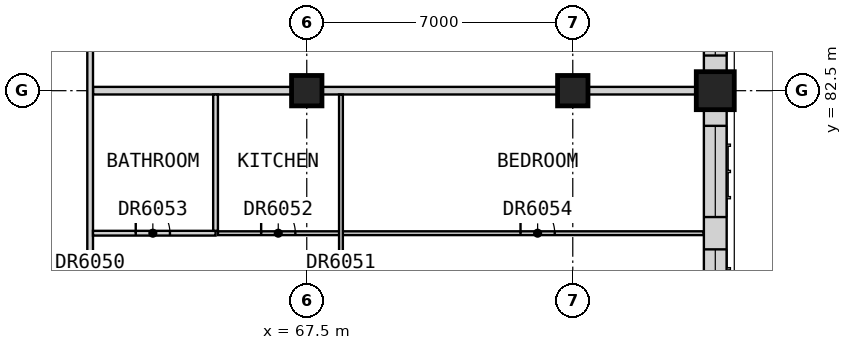
"""IFC4 building model, lengths in metres.
Left out: names, types, materials, properties, quantities, classifications, styles, units other than length and angle.
Written with IfcOpenShell. Run it as: python <this file> out.ifc"""

import sys

from ifc_helpers import new_model, si_unit, direction, frame, frame_2d, origin, origin_2d, place, context, subcontext, project, spatial, rectangle, extrude, element, fill, save


model = new_model("IFC4")
c1 = context("Model", 3, precision=1e-05, world=origin(), true_north=direction((0.0, 1.0)))
c2 = subcontext(c1, "Body", "Model", "MODEL_VIEW")
j1 = project(units=[si_unit("LENGTHUNIT", "METRE"), si_unit("PLANEANGLEUNIT", "RADIAN")], contexts=[c1])
p1 = place(None, origin())
s1 = spatial("IfcSite", under=j1, at=p1, CompositionType="ELEMENT")
p2 = place(p1, origin())
s2 = spatial("IfcBuilding", under=s1, at=p2, CompositionType="ELEMENT")
p3 = place(p2, frame((0.0, 0.0, 226.7)))
s3 = spatial("IfcBuildingStorey", under=s2, at=p3, CompositionType="ELEMENT", Elevation=226.7)
p4 = place(p3, frame((78.25, 82.5, 0.0), z_axis=(0.0, 0.0, 1.0), x_axis=(1.0, 0.0, 0.0)))
e1 = element("IfcColumn", 1, at=p4, inside=s3, PredefinedType="COLUMN", context=c2, shape_type="SweptSolid", body=[
    extrude(rectangle(XDim=1.0, YDim=1.0, at=origin_2d()), origin(), (0.0, 0.0, 1.0), 3.5),
])
for number, where, z_axis, x_axis in (
    (2, (67.5, 82.5, 0.0), (0.0, 0.0, 1.0), (1.0, 0.0, 0.0)),
    (3, (74.5, 82.5, 0.0), (0.0, 0.0, 1.0), (1.0, 0.0, 0.0)),
):
    element("IfcColumn", number, at=place(p3, frame(where, z_axis=z_axis, x_axis=x_axis)), inside=s3, PredefinedType="COLUMN", context=c2, shape_type="SweptSolid", body=[
        extrude(rectangle(XDim=0.8, YDim=0.8, at=origin_2d()), origin(), (0.0, 0.0, 1.0), 3.5),
    ])
p5 = place(p3, frame((78.25, 75.5, 0.0), z_axis=(0.0, 0.0, 1.0), x_axis=(0.0, 1.0, 0.0)))
e4 = element("IfcWall", 4, at=p5, inside=s3, PredefinedType="SOLIDWALL", context=c2, shape_type="SweptSolid", body=[
    extrude(rectangle(XDim=6.5, YDim=0.6, at=frame_2d((3.25, 0.0))), origin(), (0.0, 0.0, 1.0), 2.75),
])
p6 = place(p5, frame((0.425, 0.0, 0.8)))
e5 = element("IfcOpeningElement", 5, at=p6, cuts=e4, PredefinedType="OPENING", context=c2, shape_type="SweptSolid", body=[
    extrude(rectangle(XDim=2.4, YDim=1.8, at=frame_2d((1.2, 0.9))), frame((0.0, 0.31, 0.0), z_axis=(0.0, -1.0, 0.0), x_axis=(1.0, 0.0, 0.0)), (0.0, 0.0, 1.0), 0.62),
])
p7 = place(p5, frame((3.675, 0.0, 0.8)))
e6 = element("IfcOpeningElement", 6, at=p7, cuts=e4, PredefinedType="OPENING", context=c2, shape_type="SweptSolid", body=[
    extrude(rectangle(XDim=2.4, YDim=1.8, at=frame_2d((1.2, 0.9))), frame((0.0, 0.31, 0.0), z_axis=(0.0, -1.0, 0.0), x_axis=(1.0, 0.0, 0.0)), (0.0, 0.0, 1.0), 0.62),
])
p8 = place(p3, frame((78.25, 83.0, 0.0), z_axis=(0.0, 0.0, 1.0), x_axis=(0.0, 1.0, 0.0)))
e7 = element("IfcWall", 7, at=p8, inside=s3, PredefinedType="SOLIDWALL", context=c2, shape_type="SweptSolid", body=[
    extrude(rectangle(XDim=6.5, YDim=0.6, at=frame_2d((3.25, 0.0))), origin(), (0.0, 0.0, 1.0), 2.75),
])
p9 = place(p8, frame((0.425, 0.0, 0.8)))
e8 = element("IfcOpeningElement", 8, at=p9, cuts=e7, PredefinedType="OPENING", context=c2, shape_type="SweptSolid", body=[
    extrude(rectangle(XDim=2.4, YDim=1.8, at=frame_2d((1.2, 0.9))), frame((0.0, 0.31, 0.0), z_axis=(0.0, -1.0, 0.0), x_axis=(1.0, 0.0, 0.0)), (0.0, 0.0, 1.0), 0.62),
])
p10 = place(p8, frame((3.675, 0.0, 0.8)))
e9 = element("IfcOpeningElement", 9, at=p10, cuts=e7, PredefinedType="OPENING", context=c2, shape_type="SweptSolid", body=[
    extrude(rectangle(XDim=2.4, YDim=1.8, at=frame_2d((1.2, 0.9))), frame((0.0, 0.31, 0.0), z_axis=(0.0, -1.0, 0.0), x_axis=(1.0, 0.0, 0.0)), (0.0, 0.0, 1.0), 0.62),
])
p11 = place(p3, frame((61.875, 82.5, 0.0), z_axis=(0.0, 0.0, 1.0), x_axis=(1.0, 0.0, 0.0)))
e10 = element("IfcWall", 10, at=p11, inside=s3, PredefinedType="PARTITIONING", context=c2, shape_type="SweptSolid", body=[
    extrude(rectangle(XDim=16.875, YDim=0.2, at=frame_2d((8.438, 0.0))), origin(), (0.0, 0.0, 1.0), 3.25),
])
p12 = place(p3, frame((61.8, 58.275, 0.0), z_axis=(0.0, 0.0, 1.0), x_axis=(0.0, 1.0, 0.0)))
e11 = element("IfcWall", 11, at=p12, inside=s3, PredefinedType="PARTITIONING", context=c2, shape_type="SweptSolid", body=[
    extrude(rectangle(XDim=25.95, YDim=0.15, at=frame_2d((12.975, 0.0))), origin(), (0.0, 0.0, 1.0), 3.25),
])
p13 = place(p12, frame((4.575, 0.0, 0.0)))
e12 = element("IfcOpeningElement", 12, at=p13, cuts=e11, PredefinedType="OPENING", context=c2, shape_type="SweptSolid", body=[
    extrude(rectangle(XDim=1.8, YDim=2.1, at=frame_2d((0.9, 1.05))), frame((0.0, 0.085, 0.0), z_axis=(0.0, -1.0, 0.0), x_axis=(1.0, 0.0, 0.0)), (0.0, 0.0, 1.0), 0.17),
])
p14 = place(p12, frame((10.65, 0.0, 0.0)))
e13 = element("IfcOpeningElement", 13, at=p14, cuts=e11, PredefinedType="OPENING", context=c2, shape_type="SweptSolid", body=[
    extrude(rectangle(XDim=0.9, YDim=2.1, at=frame_2d((0.45, 1.05))), frame((0.0, 0.085, 0.0), z_axis=(0.0, -1.0, 0.0), x_axis=(1.0, 0.0, 0.0)), (0.0, 0.0, 1.0), 0.17),
])
p15 = place(p12, frame((18.15, 0.0, 0.0)))
e14 = element("IfcOpeningElement", 14, at=p15, cuts=e11, PredefinedType="OPENING", context=c2, shape_type="SweptSolid", body=[
    extrude(rectangle(XDim=0.9, YDim=2.1, at=frame_2d((0.45, 1.05))), frame((0.0, 0.085, 0.0), z_axis=(0.0, -1.0, 0.0), x_axis=(1.0, 0.0, 0.0)), (0.0, 0.0, 1.0), 0.17),
])
p16 = place(p3, frame((65.163, 78.75, 0.0), z_axis=(0.0, 0.0, 1.0), x_axis=(1.0, 0.0, 0.0)))
e15 = element("IfcWall", 15, at=p16, inside=s3, PredefinedType="PARTITIONING", context=c2, shape_type="SweptSolid", body=[
    extrude(rectangle(XDim=12.777, YDim=0.1, at=frame_2d((6.389, 0.0))), origin(), (0.0, 0.0, 1.0), 3.25),
])
p17 = place(p16, frame((1.137, 0.0, 0.0)))
e16 = element("IfcOpeningElement", 16, at=p17, cuts=e15, PredefinedType="OPENING", context=c2, shape_type="SweptSolid", body=[
    extrude(rectangle(XDim=0.9, YDim=2.1, at=frame_2d((0.45, 1.05))), frame((0.0, 0.06, 0.0), z_axis=(0.0, -1.0, 0.0), x_axis=(1.0, 0.0, 0.0)), (0.0, 0.0, 1.0), 0.12),
])
p18 = place(p16, frame((7.962, 0.0, 0.0)))
e17 = element("IfcOpeningElement", 17, at=p18, cuts=e15, PredefinedType="OPENING", context=c2, shape_type="SweptSolid", body=[
    extrude(rectangle(XDim=0.9, YDim=2.1, at=frame_2d((0.45, 1.05))), frame((0.0, 0.06, 0.0), z_axis=(0.0, -1.0, 0.0), x_axis=(1.0, 0.0, 0.0)), (0.0, 0.0, 1.0), 0.12),
])
p19 = place(p3, frame((68.4, 67.6, 0.0), z_axis=(0.0, 0.0, 1.0), x_axis=(0.0, 1.0, 0.0)))
e18 = element("IfcWall", 18, at=p19, inside=s3, PredefinedType="PARTITIONING", context=c2, shape_type="SweptSolid", body=[
    extrude(rectangle(XDim=14.8, YDim=0.1, at=frame_2d((7.4, 0.0))), origin(), (0.0, 0.0, 1.0), 3.25),
])
p20 = place(p19, frame((1.325, 0.0, 0.0)))
e19 = element("IfcOpeningElement", 19, at=p20, cuts=e18, PredefinedType="OPENING", context=c2, shape_type="SweptSolid", body=[
    extrude(rectangle(XDim=0.9, YDim=2.1, at=frame_2d((0.45, 1.05))), frame((0.0, 0.06, 0.0), z_axis=(0.0, -1.0, 0.0), x_axis=(1.0, 0.0, 0.0)), (0.0, 0.0, 1.0), 0.12),
])
p21 = place(p19, frame((8.825, 0.0, 0.0)))
e20 = element("IfcOpeningElement", 20, at=p21, cuts=e18, PredefinedType="OPENING", context=c2, shape_type="SweptSolid", body=[
    extrude(rectangle(XDim=0.9, YDim=2.1, at=frame_2d((0.45, 1.05))), frame((0.0, 0.06, 0.0), z_axis=(0.0, -1.0, 0.0), x_axis=(1.0, 0.0, 0.0)), (0.0, 0.0, 1.0), 0.12),
])
p22 = place(p3, frame((61.875, 78.75, 0.0), z_axis=(0.0, 0.0, 1.0), x_axis=(1.0, 0.0, 0.0)))
e21 = element("IfcWall", 21, at=p22, inside=s3, PredefinedType="PARTITIONING", context=c2, shape_type="SweptSolid", body=[
    extrude(rectangle(XDim=3.225, YDim=0.125, at=frame_2d((1.613, 0.0))), origin(), (0.0, 0.0, 1.0), 3.25),
])
p23 = place(p22, frame((1.125, 0.0, 0.0)))
e22 = element("IfcOpeningElement", 22, at=p23, cuts=e21, PredefinedType="OPENING", context=c2, shape_type="SweptSolid", body=[
    extrude(rectangle(XDim=0.9, YDim=2.1, at=frame_2d((0.45, 1.05))), frame((0.0, 0.073, 0.0), z_axis=(0.0, -1.0, 0.0), x_axis=(1.0, 0.0, 0.0)), (0.0, 0.0, 1.0), 0.145),
])
p24 = place(p3, frame((65.1, 78.812, 0.0), z_axis=(0.0, 0.0, 1.0), x_axis=(0.0, 1.0, 0.0)))
e23 = element("IfcWall", 23, at=p24, inside=s3, PredefinedType="PARTITIONING", context=c2, shape_type="SweptSolid", body=[
    extrude(rectangle(XDim=3.587, YDim=0.125, at=frame_2d((1.794, 0.0))), origin(), (0.0, 0.0, 1.0), 3.25),
])
p25 = place(p6, origin())
e24 = element("IfcWindow", 24, at=p25, inside=s3, PartitioningType="SINGLE_PANEL", PredefinedType="WINDOW", context=c2, shape_type="SweptSolid", body=[
    extrude(rectangle(XDim=2.4, YDim=1.8, at=frame_2d((1.2, 0.9))), frame((0.0, -0.07, 0.0), z_axis=(0.0, -1.0, 0.0), x_axis=(1.0, 0.0, 0.0)), (0.0, 0.0, 1.0), 0.06),
])
fill(e5, e24)
p26 = place(p7, origin())
e25 = element("IfcWindow", 25, at=p26, inside=s3, PartitioningType="SINGLE_PANEL", PredefinedType="WINDOW", context=c2, shape_type="SweptSolid", body=[
    extrude(rectangle(XDim=2.4, YDim=1.8, at=frame_2d((1.2, 0.9))), frame((0.0, -0.07, 0.0), z_axis=(0.0, -1.0, 0.0), x_axis=(1.0, 0.0, 0.0)), (0.0, 0.0, 1.0), 0.06),
])
fill(e6, e25)
p27 = place(p9, origin())
e26 = element("IfcWindow", 26, at=p27, inside=s3, PartitioningType="SINGLE_PANEL", PredefinedType="WINDOW", context=c2, shape_type="SweptSolid", body=[
    extrude(rectangle(XDim=2.4, YDim=1.8, at=frame_2d((1.2, 0.9))), frame((0.0, -0.07, 0.0), z_axis=(0.0, -1.0, 0.0), x_axis=(1.0, 0.0, 0.0)), (0.0, 0.0, 1.0), 0.06),
])
fill(e8, e26)
p28 = place(p17, origin())
e27 = element("IfcDoor", 27, at=p28, inside=s3, OperationType="SINGLE_SWING_LEFT", PredefinedType="DOOR", context=c2, shape_type="SweptSolid", body=[
    extrude(rectangle(XDim=0.9, YDim=2.1, at=frame_2d((0.45, 1.05))), frame((0.0, 0.025, 0.0), z_axis=(0.0, -1.0, 0.0), x_axis=(1.0, 0.0, 0.0)), (0.0, 0.0, 1.0), 0.05),
])
fill(e16, e27)
p29 = place(p23, origin())
e28 = element("IfcDoor", 28, at=p29, inside=s3, OperationType="SINGLE_SWING_RIGHT", PredefinedType="DOOR", context=c2, shape_type="SweptSolid", body=[
    extrude(rectangle(XDim=0.9, YDim=2.1, at=frame_2d((0.45, 1.05))), frame((0.0, 0.025, 0.0), z_axis=(0.0, -1.0, 0.0), x_axis=(1.0, 0.0, 0.0)), (0.0, 0.0, 1.0), 0.05),
])
fill(e22, e28)
p30 = place(p18, origin())
e29 = element("IfcDoor", 29, at=p30, inside=s3, OperationType="SINGLE_SWING_LEFT", PredefinedType="DOOR", context=c2, shape_type="SweptSolid", body=[
    extrude(rectangle(XDim=0.9, YDim=2.1, at=frame_2d((0.45, 1.05))), frame((0.0, 0.025, 0.0), z_axis=(0.0, -1.0, 0.0), x_axis=(1.0, 0.0, 0.0)), (0.0, 0.0, 1.0), 0.05),
])
fill(e17, e29)
save(model, sys.argv[1])
